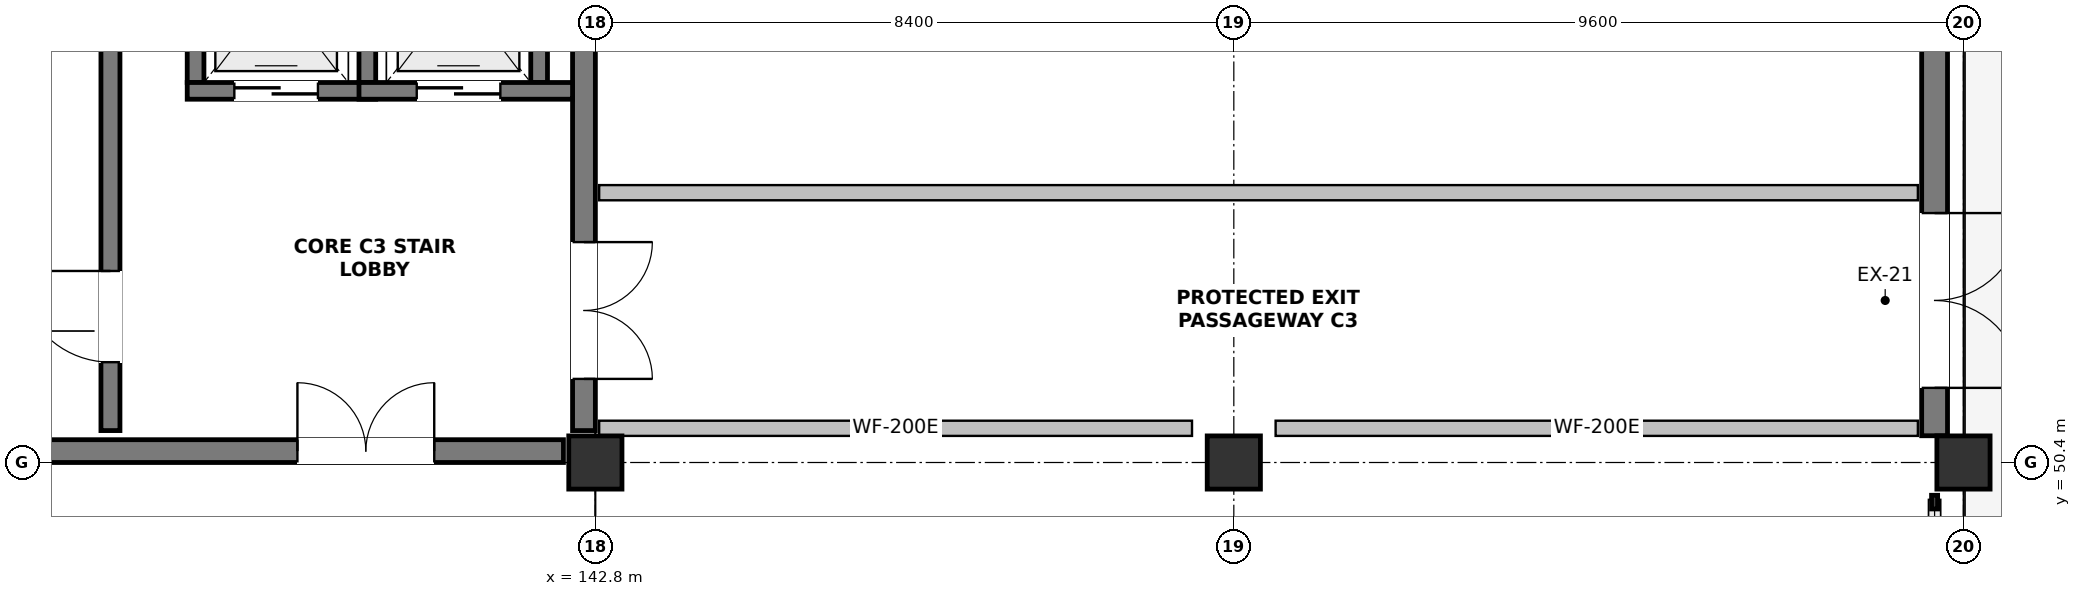
"""IFC4 building model, lengths in metres.
Left out: names, types, materials, properties, quantities, classifications, styles, units other than length and angle.
Written with IfcOpenShell. Run it as: python <this file> out.ifc"""

import sys

from ifc_helpers import new_model, si_unit, direction, frame, frame_2d, origin, origin_2d, place, context, subcontext, project, spatial, rectangle, extrude, element, fill, save


model = new_model("IFC4")
c1 = context("Model", 3, precision=1e-05, world=origin(), true_north=direction((0.0, 1.0)))
c2 = subcontext(c1, "Body", "Model", "MODEL_VIEW")
j1 = project(units=[si_unit("LENGTHUNIT", "METRE"), si_unit("PLANEANGLEUNIT", "RADIAN")], contexts=[c1])
p1 = place(None, origin())
s1 = spatial("IfcSite", under=j1, at=p1, CompositionType="ELEMENT")
p2 = place(p1, origin())
s2 = spatial("IfcBuilding", under=s1, at=p2, CompositionType="ELEMENT")
p3 = place(p2, origin())
s3 = spatial("IfcBuildingStorey", under=s2, at=p3, CompositionType="ELEMENT", Elevation=0.0)
for number, where, z_axis, x_axis in (
    (1, (142.8, 50.4, 0.0), (0.0, 0.0, 1.0), (1.0, 0.0, 0.0)),
    (2, (151.2, 50.4, 0.0), (0.0, 0.0, 1.0), (1.0, 0.0, 0.0)),
    (3, (160.8, 50.4, 0.0), (0.0, 0.0, 1.0), (1.0, 0.0, 0.0)),
):
    element("IfcColumn", number, at=place(p3, frame(where, z_axis=z_axis, x_axis=x_axis)), inside=s3, PredefinedType="COLUMN", context=c2, shape_type="SweptSolid", body=[
        extrude(rectangle(XDim=0.7, YDim=0.7, at=origin_2d()), origin(), (0.0, 0.0, 1.0), 5.1),
    ])
p4 = place(p3, frame((160.42, 58.561, 0.0), z_axis=(0.0, 0.0, 1.0), x_axis=(0.0, -1.0, 0.0)))
e4 = element("IfcWall", 4, at=p4, inside=s3, PredefinedType="SOLIDWALL", context=c2, shape_type="SweptSolid", body=[
    extrude(rectangle(XDim=7.809, YDim=0.34, at=frame_2d((3.904, 0.0))), origin(), (0.0, 0.0, 1.0), 3.85),
])
p5 = place(p4, frame((4.879, 0.0, 0.0)))
e5 = element("IfcOpeningElement", 5, at=p5, cuts=e4, PredefinedType="OPENING", context=c2, shape_type="SweptSolid", body=[
    extrude(rectangle(XDim=2.3, YDim=2.4, at=frame_2d((1.15, 1.2))), frame((0.0, 0.182, 0.0), z_axis=(0.0, -1.0, 0.0), x_axis=(1.0, 0.0, 0.0)), (0.0, 0.0, 1.0), 0.364),
])
p6 = place(p3, frame((126.45, 50.55, 0.0), z_axis=(0.0, 0.0, 1.0), x_axis=(1.0, 0.0, 0.0)))
e6 = element("IfcWall", 6, at=p6, inside=s3, PredefinedType="SHEAR", context=c2, shape_type="SweptSolid", body=[
    extrude(rectangle(XDim=15.93, YDim=0.3, at=frame_2d((7.965, 0.0))), origin(), (0.0, 0.0, 1.0), 4.7),
])
p7 = place(p6, frame((12.43, 0.0, 0.0)))
e7 = element("IfcOpeningElement", 7, at=p7, cuts=e6, PredefinedType="OPENING", context=c2, shape_type="SweptSolid", body=[
    extrude(rectangle(XDim=1.8, YDim=2.2, at=frame_2d((0.9, 1.1))), frame((0.0, 0.162, 0.0), z_axis=(0.0, -1.0, 0.0), x_axis=(1.0, 0.0, 0.0)), (0.0, 0.0, 1.0), 0.324),
])
p8 = place(p3, frame((142.65, 50.82, 0.0), z_axis=(0.0, 0.0, 1.0), x_axis=(0.0, 1.0, 0.0)))
e8 = element("IfcWall", 8, at=p8, inside=s3, PredefinedType="SHEAR", context=c2, shape_type="SweptSolid", body=[
    extrude(rectangle(XDim=7.56, YDim=0.3, at=frame_2d((3.78, 0.0))), origin(), (0.0, 0.0, 1.0), 4.7),
])
p9 = place(p8, frame((0.68, 0.0, 0.0)))
e9 = element("IfcOpeningElement", 9, at=p9, cuts=e8, PredefinedType="OPENING", context=c2, shape_type="SweptSolid", body=[
    extrude(rectangle(XDim=1.8, YDim=2.2, at=frame_2d((0.9, 1.1))), frame((0.0, 0.162, 0.0), z_axis=(0.0, -1.0, 0.0), x_axis=(1.0, 0.0, 0.0)), (0.0, 0.0, 1.0), 0.324),
])
p10 = place(p3, frame((136.42, 50.82, 0.0), z_axis=(0.0, 0.0, 1.0), x_axis=(0.0, 1.0, 0.0)))
e10 = element("IfcWall", 10, at=p10, inside=s3, PredefinedType="SHEAR", context=c2, shape_type="SweptSolid", body=[
    extrude(rectangle(XDim=7.56, YDim=0.25, at=frame_2d((3.78, 0.0))), origin(), (0.0, 0.0, 1.0), 4.7),
])
p11 = place(p10, frame((0.9, 0.0, 0.0)))
e11 = element("IfcOpeningElement", 11, at=p11, cuts=e10, PredefinedType="OPENING", context=c2, shape_type="SweptSolid", body=[
    extrude(rectangle(XDim=1.2, YDim=2.2, at=frame_2d((0.6, 1.1))), frame((0.0, 0.137, 0.0), z_axis=(0.0, -1.0, 0.0), x_axis=(1.0, 0.0, 0.0)), (0.0, 0.0, 1.0), 0.274),
])
p12 = place(p3, frame((137.54, 55.4, 0.0), z_axis=(0.0, 0.0, 1.0), x_axis=(0.0, 1.0, 0.0)))
e12 = element("IfcWall", 12, at=p12, inside=s3, PredefinedType="SOLIDWALL", context=c2, shape_type="SweptSolid", body=[
    extrude(rectangle(XDim=2.4, YDim=0.22, at=frame_2d((1.2, 0.0))), origin(), (0.0, 0.0, 1.0), 4.7),
])
p13 = place(p3, frame((137.43, 55.29, 0.0), z_axis=(0.0, 0.0, 1.0), x_axis=(1.0, 0.0, 0.0)))
e13 = element("IfcWall", 13, at=p13, inside=s3, PredefinedType="SOLIDWALL", context=c2, shape_type="SweptSolid", body=[
    extrude(rectangle(XDim=2.48, YDim=0.22, at=frame_2d((1.24, 0.0))), origin(), (0.0, 0.0, 1.0), 4.7),
])
p14 = place(p13, frame((0.62, 0.0, 0.0)))
e14 = element("IfcOpeningElement", 14, at=p14, cuts=e13, PredefinedType="OPENING", context=c2, shape_type="SweptSolid", body=[
    extrude(rectangle(XDim=1.1, YDim=2.15, at=frame_2d((0.55, 1.075))), frame((0.0, 0.122, 0.0), z_axis=(0.0, -1.0, 0.0), x_axis=(1.0, 0.0, 0.0)), (0.0, 0.0, 1.0), 0.244),
])
for number, where, z_axis, x_axis in (
    (15, (139.8, 55.4, 0.0), (0.0, 0.0, 1.0), (0.0, 1.0, 0.0)),
    (16, (142.06, 55.4, 0.0), (0.0, 0.0, 1.0), (0.0, 1.0, 0.0)),
):
    element("IfcWall", number, at=place(p3, frame(where, z_axis=z_axis, x_axis=x_axis)), inside=s3, PredefinedType="SOLIDWALL", context=c2, shape_type="SweptSolid", body=[
        extrude(rectangle(XDim=2.4, YDim=0.22, at=frame_2d((1.2, 0.0))), origin(), (0.0, 0.0, 1.0), 4.7),
    ])
p15 = place(p3, frame((139.69, 55.29, 0.0), z_axis=(0.0, 0.0, 1.0), x_axis=(1.0, 0.0, 0.0)))
e17 = element("IfcWall", 17, at=p15, inside=s3, PredefinedType="SOLIDWALL", context=c2, shape_type="SweptSolid", body=[
    extrude(rectangle(XDim=2.81, YDim=0.22, at=frame_2d((1.405, 0.0))), origin(), (0.0, 0.0, 1.0), 4.7),
])
p16 = place(p15, frame((0.76, 0.0, 0.0)))
e18 = element("IfcOpeningElement", 18, at=p16, cuts=e17, PredefinedType="OPENING", context=c2, shape_type="SweptSolid", body=[
    extrude(rectangle(XDim=1.1, YDim=2.15, at=frame_2d((0.55, 1.075))), frame((0.0, 0.122, 0.0), z_axis=(0.0, -1.0, 0.0), x_axis=(1.0, 0.0, 0.0)), (0.0, 0.0, 1.0), 0.244),
])
p17 = place(p3, frame((142.85, 50.85, 0.0), z_axis=(0.0, 0.0, 1.0), x_axis=(1.0, 0.0, 0.0)))
e19 = element("IfcWall", 19, at=p17, inside=s3, PredefinedType="PARTITIONING", context=c2, shape_type="SweptSolid", body=[
    extrude(rectangle(XDim=7.8, YDim=0.2, at=frame_2d((3.9, 0.0))), origin(), (0.0, 0.0, 1.0), 3.9),
])
p18 = place(p3, frame((151.75, 50.85, 0.0), z_axis=(0.0, 0.0, 1.0), x_axis=(1.0, 0.0, 0.0)))
e20 = element("IfcWall", 20, at=p18, inside=s3, PredefinedType="PARTITIONING", context=c2, shape_type="SweptSolid", body=[
    extrude(rectangle(XDim=8.45, YDim=0.2, at=frame_2d((4.225, 0.0))), origin(), (0.0, 0.0, 1.0), 3.85),
])
p19 = place(p3, frame((142.85, 53.95, 0.0), z_axis=(0.0, 0.0, 1.0), x_axis=(1.0, 0.0, 0.0)))
e21 = element("IfcWall", 21, at=p19, inside=s3, PredefinedType="PARTITIONING", context=c2, shape_type="SweptSolid", body=[
    extrude(rectangle(XDim=17.35, YDim=0.2, at=frame_2d((8.675, 0.0))), origin(), (0.0, 0.0, 1.0), 4.7),
])
p20 = place(p5, origin())
e22 = element("IfcDoor", 22, at=p20, inside=s3, OperationType="DOUBLE_DOOR_SINGLE_SWING", PredefinedType="DOOR", context=c2, shape_type="SweptSolid", body=[
    extrude(rectangle(XDim=2.3, YDim=2.4, at=frame_2d((1.15, 1.2))), frame((0.0, 0.025, 0.0), z_axis=(0.0, -1.0, 0.0), x_axis=(1.0, 0.0, 0.0)), (0.0, 0.0, 1.0), 0.05),
])
fill(e5, e22)
p21 = place(p7, origin())
e23 = element("IfcDoor", 23, at=p21, inside=s3, OperationType="DOUBLE_DOOR_SINGLE_SWING", PredefinedType="DOOR", context=c2, shape_type="SweptSolid", body=[
    extrude(rectangle(XDim=1.8, YDim=2.2, at=frame_2d((0.9, 1.1))), frame((0.0, 0.025, 0.0), z_axis=(0.0, -1.0, 0.0), x_axis=(1.0, 0.0, 0.0)), (0.0, 0.0, 1.0), 0.05),
])
fill(e7, e23)
p22 = place(p9, frame((1.8, 0.0, 0.0), z_axis=(0.0, 0.0, 1.0), x_axis=(-1.0, 0.0, 0.0)))
e24 = element("IfcDoor", 24, at=p22, inside=s3, OperationType="DOUBLE_DOOR_SINGLE_SWING", PredefinedType="DOOR", context=c2, shape_type="SweptSolid", body=[
    extrude(rectangle(XDim=1.8, YDim=2.2, at=frame_2d((0.9, 1.1))), frame((0.0, 0.025, 0.0), z_axis=(0.0, -1.0, 0.0), x_axis=(1.0, 0.0, 0.0)), (0.0, 0.0, 1.0), 0.05),
])
fill(e9, e24)
p23 = place(p11, origin())
e25 = element("IfcDoor", 25, at=p23, inside=s3, OperationType="SINGLE_SWING_RIGHT", PredefinedType="DOOR", context=c2, shape_type="SweptSolid", body=[
    extrude(rectangle(XDim=1.2, YDim=2.2, at=frame_2d((0.6, 1.1))), frame((0.0, 0.025, 0.0), z_axis=(0.0, -1.0, 0.0), x_axis=(1.0, 0.0, 0.0)), (0.0, 0.0, 1.0), 0.05),
])
fill(e11, e25)
p24 = place(p14, origin())
e26 = element("IfcDoor", 26, at=p24, inside=s3, OperationType="DOUBLE_DOOR_SLIDING", PredefinedType="DOOR", context=c2, shape_type="SweptSolid", body=[
    extrude(rectangle(XDim=1.1, YDim=2.15, at=frame_2d((0.55, 1.075))), frame((0.0, 0.025, 0.0), z_axis=(0.0, -1.0, 0.0), x_axis=(1.0, 0.0, 0.0)), (0.0, 0.0, 1.0), 0.05),
])
fill(e14, e26)
p25 = place(p16, origin())
e27 = element("IfcDoor", 27, at=p25, inside=s3, OperationType="DOUBLE_DOOR_SLIDING", PredefinedType="DOOR", context=c2, shape_type="SweptSolid", body=[
    extrude(rectangle(XDim=1.1, YDim=2.15, at=frame_2d((0.55, 1.075))), frame((0.0, 0.025, 0.0), z_axis=(0.0, -1.0, 0.0), x_axis=(1.0, 0.0, 0.0)), (0.0, 0.0, 1.0), 0.05),
])
fill(e18, e27)
save(model, sys.argv[1])
